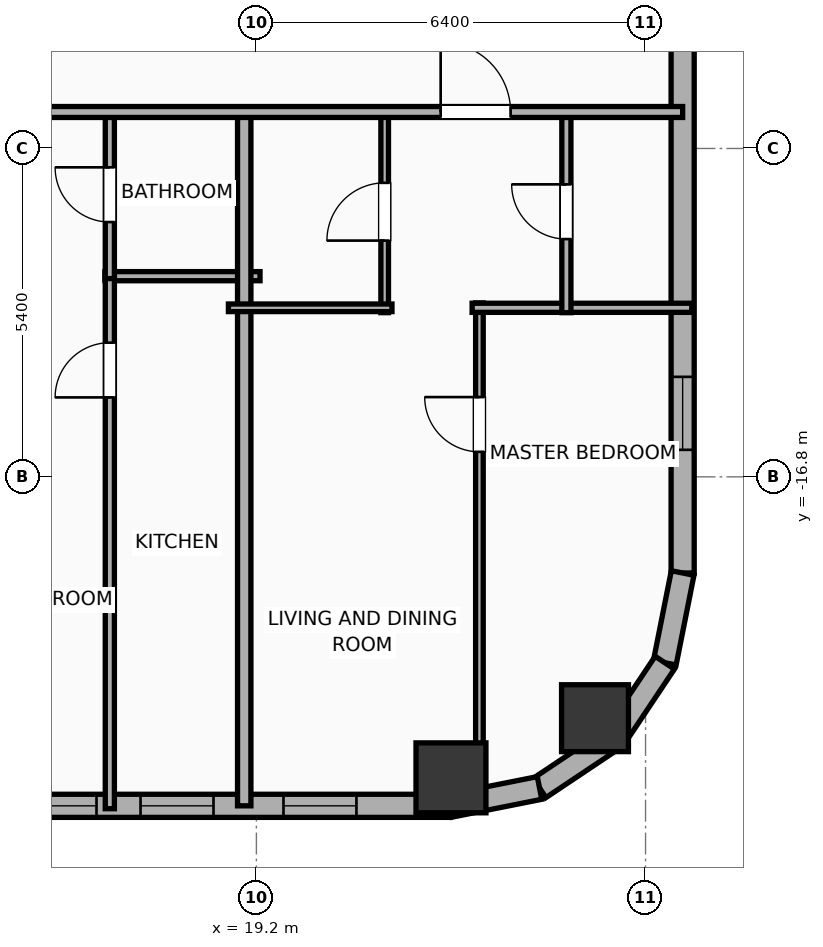
"""IFC4 building model, lengths in metres.
Left out: names, types, materials, properties, quantities, classifications, styles, units other than length and angle.
Written with IfcOpenShell. Run it as: python <this file> out.ifc"""

import sys

from ifc_helpers import new_model, si_unit, direction, frame, frame_2d, origin, origin_2d, place, context, subcontext, project, spatial, rectangle, hollow_rectangle, hollow_circle, extrude, element, fill, save


model = new_model("IFC4")
c1 = context("Model", 3, precision=1e-05, world=origin(), true_north=direction((0.0, 1.0)))
c2 = subcontext(c1, "Body", "Model", "MODEL_VIEW")
j1 = project(units=[si_unit("LENGTHUNIT", "METRE"), si_unit("PLANEANGLEUNIT", "RADIAN")], contexts=[c1])
p1 = place(None, origin())
s1 = spatial("IfcSite", under=j1, at=p1, CompositionType="ELEMENT")
p2 = place(p1, origin())
s2 = spatial("IfcBuilding", under=s1, at=p2, CompositionType="ELEMENT")
p3 = place(p2, frame((0.0, 0.0, 29.9)))
s3 = spatial("IfcBuildingStorey", under=s2, at=p3, CompositionType="ELEMENT", Elevation=29.9)
p4 = place(p3, frame((22.4, -21.75, 0.0), z_axis=(0.0, 0.0, 1.0), x_axis=(1.0, 0.0, 0.0)))
e1 = element("IfcColumn", 1, at=p4, inside=s3, PredefinedType="COLUMN", context=c2, shape_type="SweptSolid", body=[
    extrude(hollow_rectangle(XDim=1.15, YDim=1.15, WallThickness=0.04, at=origin_2d()), origin(), (0.0, 0.0, 1.0), 3.9),
])
p5 = place(p3, frame((24.769, -20.769, 0.0), z_axis=(0.0, 0.0, 1.0), x_axis=(1.0, 0.0, 0.0)))
e2 = element("IfcColumn", 2, at=p5, inside=s3, PredefinedType="COLUMN", context=c2, shape_type="SweptSolid", body=[
    extrude(hollow_circle(Radius=0.55, WallThickness=0.036, at=origin_2d()), origin(), (0.0, 0.0, 1.0), 3.9),
])
p6 = place(p3, frame((22.381, -22.21, 0.0), z_axis=(0.0, 0.0, 1.0), x_axis=(-1.0, 0.0, 0.0)))
e3 = element("IfcWall", 3, at=p6, inside=s3, PredefinedType="ELEMENTEDWALL", context=c2, shape_type="SweptSolid", body=[
    extrude(rectangle(XDim=51.963, YDim=0.38, at=frame_2d((25.981, 0.0))), origin(), (0.0, 0.0, 1.0), 2.54),
])
p7 = place(p6, frame((5.81, 0.0, 0.75)))
e4 = element("IfcOpeningElement", 4, at=p7, cuts=e3, PredefinedType="OPENING", context=c2, shape_type="SweptSolid", body=[
    extrude(rectangle(XDim=2.4, YDim=1.63, at=frame_2d((1.2, 0.815))), frame((0.0, 0.2, 0.0), z_axis=(0.0, -1.0, 0.0), x_axis=(1.0, 0.0, 0.0)), (0.0, 0.0, 1.0), 0.4),
])
p8 = place(p6, frame((26.431, 0.0, 0.75)))
e5 = element("IfcOpeningElement", 5, at=p8, cuts=e3, PredefinedType="OPENING", context=c2, shape_type="SweptSolid", body=[
    extrude(rectangle(XDim=2.4, YDim=1.63, at=frame_2d((1.2, 0.815))), frame((0.0, 0.2, 0.0), z_axis=(0.0, -1.0, 0.0), x_axis=(1.0, 0.0, 0.0)), (0.0, 0.0, 1.0), 0.4),
])
p9 = place(p6, frame((42.952, 0.0, 0.75)))
e6 = element("IfcOpeningElement", 6, at=p9, cuts=e3, PredefinedType="OPENING", context=c2, shape_type="SweptSolid", body=[
    extrude(rectangle(XDim=2.4, YDim=1.63, at=frame_2d((1.2, 0.815))), frame((0.0, 0.2, 0.0), z_axis=(0.0, -1.0, 0.0), x_axis=(1.0, 0.0, 0.0)), (0.0, 0.0, 1.0), 0.4),
])
p10 = place(p6, frame((49.027, 0.0, 0.75)))
e7 = element("IfcOpeningElement", 7, at=p10, cuts=e3, PredefinedType="OPENING", context=c2, shape_type="SweptSolid", body=[
    extrude(rectangle(XDim=1.2, YDim=1.63, at=frame_2d((0.6, 0.815))), frame((0.0, 0.2, 0.0), z_axis=(0.0, -1.0, 0.0), x_axis=(1.0, 0.0, 0.0)), (0.0, 0.0, 1.0), 0.4),
])
p11 = place(p6, frame((46.476, 0.0, 0.75)))
e8 = element("IfcOpeningElement", 8, at=p11, cuts=e3, PredefinedType="OPENING", context=c2, shape_type="SweptSolid", body=[
    extrude(rectangle(XDim=1.2, YDim=1.63, at=frame_2d((0.6, 0.815))), frame((0.0, 0.2, 0.0), z_axis=(0.0, -1.0, 0.0), x_axis=(1.0, 0.0, 0.0)), (0.0, 0.0, 1.0), 0.4),
])
p12 = place(p6, frame((39.181, 0.0, 0.75)))
e9 = element("IfcOpeningElement", 9, at=p12, cuts=e3, PredefinedType="OPENING", context=c2, shape_type="SweptSolid", body=[
    extrude(rectangle(XDim=1.2, YDim=1.63, at=frame_2d((0.6, 0.815))), frame((0.0, 0.2, 0.0), z_axis=(0.0, -1.0, 0.0), x_axis=(1.0, 0.0, 0.0)), (0.0, 0.0, 1.0), 0.4),
])
p13 = place(p6, frame((32.476, 0.0, 0.75)))
e10 = element("IfcOpeningElement", 10, at=p13, cuts=e3, PredefinedType="OPENING", context=c2, shape_type="SweptSolid", body=[
    extrude(rectangle(XDim=1.2, YDim=1.63, at=frame_2d((0.6, 0.815))), frame((0.0, 0.2, 0.0), z_axis=(0.0, -1.0, 0.0), x_axis=(1.0, 0.0, 0.0)), (0.0, 0.0, 1.0), 0.4),
])
p14 = place(p6, frame((35.276, 0.0, 0.75)))
e11 = element("IfcOpeningElement", 11, at=p14, cuts=e3, PredefinedType="OPENING", context=c2, shape_type="SweptSolid", body=[
    extrude(rectangle(XDim=1.2, YDim=1.63, at=frame_2d((0.6, 0.815))), frame((0.0, 0.2, 0.0), z_axis=(0.0, -1.0, 0.0), x_axis=(1.0, 0.0, 0.0)), (0.0, 0.0, 1.0), 0.4),
])
p15 = place(p6, frame((29.491, 0.0, 0.75)))
e12 = element("IfcOpeningElement", 12, at=p15, cuts=e3, PredefinedType="OPENING", context=c2, shape_type="SweptSolid", body=[
    extrude(rectangle(XDim=0.85, YDim=1.63, at=frame_2d((0.425, 0.815))), frame((0.0, 0.2, 0.0), z_axis=(0.0, -1.0, 0.0), x_axis=(1.0, 0.0, 0.0)), (0.0, 0.0, 1.0), 0.4),
])
p16 = place(p6, frame((21.596, 0.0, 0.75)))
e13 = element("IfcOpeningElement", 13, at=p16, cuts=e3, PredefinedType="OPENING", context=c2, shape_type="SweptSolid", body=[
    extrude(rectangle(XDim=1.2, YDim=1.63, at=frame_2d((0.6, 0.815))), frame((0.0, 0.2, 0.0), z_axis=(0.0, -1.0, 0.0), x_axis=(1.0, 0.0, 0.0)), (0.0, 0.0, 1.0), 0.4),
])
p17 = place(p6, frame((24.036, 0.0, 0.75)))
e14 = element("IfcOpeningElement", 14, at=p17, cuts=e3, PredefinedType="OPENING", context=c2, shape_type="SweptSolid", body=[
    extrude(rectangle(XDim=1.2, YDim=1.63, at=frame_2d((0.6, 0.815))), frame((0.0, 0.2, 0.0), z_axis=(0.0, -1.0, 0.0), x_axis=(1.0, 0.0, 0.0)), (0.0, 0.0, 1.0), 0.4),
])
p18 = place(p6, frame((17.886, 0.0, 0.75)))
e15 = element("IfcOpeningElement", 15, at=p18, cuts=e3, PredefinedType="OPENING", context=c2, shape_type="SweptSolid", body=[
    extrude(rectangle(XDim=1.2, YDim=1.63, at=frame_2d((0.6, 0.815))), frame((0.0, 0.2, 0.0), z_axis=(0.0, -1.0, 0.0), x_axis=(1.0, 0.0, 0.0)), (0.0, 0.0, 1.0), 0.4),
])
p19 = place(p6, frame((15.086, 0.0, 0.75)))
e16 = element("IfcOpeningElement", 16, at=p19, cuts=e3, PredefinedType="OPENING", context=c2, shape_type="SweptSolid", body=[
    extrude(rectangle(XDim=1.2, YDim=1.63, at=frame_2d((0.6, 0.815))), frame((0.0, 0.2, 0.0), z_axis=(0.0, -1.0, 0.0), x_axis=(1.0, 0.0, 0.0)), (0.0, 0.0, 1.0), 0.4),
])
p20 = place(p6, frame((11.181, 0.0, 0.75)))
e17 = element("IfcOpeningElement", 17, at=p20, cuts=e3, PredefinedType="OPENING", context=c2, shape_type="SweptSolid", body=[
    extrude(rectangle(XDim=1.2, YDim=1.63, at=frame_2d((0.6, 0.815))), frame((0.0, 0.2, 0.0), z_axis=(0.0, -1.0, 0.0), x_axis=(1.0, 0.0, 0.0)), (0.0, 0.0, 1.0), 0.4),
])
p21 = place(p6, frame((3.886, 0.0, 0.75)))
e18 = element("IfcOpeningElement", 18, at=p21, cuts=e3, PredefinedType="OPENING", context=c2, shape_type="SweptSolid", body=[
    extrude(rectangle(XDim=1.2, YDim=1.63, at=frame_2d((0.6, 0.815))), frame((0.0, 0.2, 0.0), z_axis=(0.0, -1.0, 0.0), x_axis=(1.0, 0.0, 0.0)), (0.0, 0.0, 1.0), 0.4),
])
p22 = place(p6, frame((1.536, 0.0, 0.75)))
e19 = element("IfcOpeningElement", 19, at=p22, cuts=e3, PredefinedType="OPENING", context=c2, shape_type="SweptSolid", body=[
    extrude(rectangle(XDim=1.2, YDim=1.63, at=frame_2d((0.6, 0.815))), frame((0.0, 0.2, 0.0), z_axis=(0.0, -1.0, 0.0), x_axis=(1.0, 0.0, 0.0)), (0.0, 0.0, 1.0), 0.4),
])
p23 = place(p3, frame((26.21, 18.381, 0.0), z_axis=(0.0, 0.0, 1.0), x_axis=(0.0, -1.0, 0.0)))
e20 = element("IfcWall", 20, at=p23, inside=s3, PredefinedType="ELEMENTEDWALL", context=c2, shape_type="SweptSolid", body=[
    extrude(rectangle(XDim=36.763, YDim=0.38, at=frame_2d((18.381, 0.0))), origin(), (0.0, 0.0, 1.0), 2.54),
])
p24 = place(p23, frame((33.537, 0.0, 0.75)))
e21 = element("IfcOpeningElement", 21, at=p24, cuts=e20, PredefinedType="OPENING", context=c2, shape_type="SweptSolid", body=[
    extrude(rectangle(XDim=1.2, YDim=1.63, at=frame_2d((0.6, 0.815))), frame((0.0, 0.2, 0.0), z_axis=(0.0, -1.0, 0.0), x_axis=(1.0, 0.0, 0.0)), (0.0, 0.0, 1.0), 0.4),
])
p25 = place(p3, frame((26.21, -18.381, 0.0), z_axis=(0.0, 0.0, 1.0), x_axis=(-0.195086038585, -0.980786132421, 0.0)))
e22 = element("IfcWall", 22, at=p25, inside=s3, PredefinedType="ELEMENTEDWALL", context=c2, shape_type="SweptSolid", body=[
    extrude(rectangle(XDim=1.504, YDim=0.38, at=frame_2d((0.752, 0.0))), origin(), (0.0, 0.0, 1.0), 3.65),
])
p26 = place(p3, frame((25.917, -19.857, 0.0), z_axis=(0.0, 0.0, 1.0), x_axis=(-0.555686231674, -0.831392092774, 0.0)))
e23 = element("IfcWall", 23, at=p26, inside=s3, PredefinedType="ELEMENTEDWALL", context=c2, shape_type="SweptSolid", body=[
    extrude(rectangle(XDim=1.485, YDim=0.38, at=frame_2d((0.743, 0.0))), origin(), (0.0, 0.0, 1.0), 3.65),
])
p27 = place(p3, frame((25.091, -21.091, 0.0), z_axis=(0.0, 0.0, 1.0), x_axis=(-0.831392092774, -0.555686231674, 0.0)))
e24 = element("IfcWall", 24, at=p27, inside=s3, PredefinedType="ELEMENTEDWALL", context=c2, shape_type="SweptSolid", body=[
    extrude(rectangle(XDim=1.485, YDim=0.38, at=frame_2d((0.743, 0.0))), origin(), (0.0, 0.0, 1.0), 2.54),
])
p28 = place(p3, frame((23.857, -21.917, 0.0), z_axis=(0.0, 0.0, 1.0), x_axis=(-0.980786132421, -0.195086038585, 0.0)))
e25 = element("IfcWall", 25, at=p28, inside=s3, PredefinedType="ELEMENTEDWALL", context=c2, shape_type="SweptSolid", body=[
    extrude(rectangle(XDim=1.504, YDim=0.38, at=frame_2d((0.752, 0.0))), origin(), (0.0, 0.0, 1.0), 2.54),
])
p29 = place(p3, frame((16.71, -13.5, 0.0), z_axis=(0.0, 0.0, 1.0), x_axis=(1.0, 0.0, 0.0)))
e26 = element("IfcWall", 26, at=p29, inside=s3, PredefinedType="PLUMBINGWALL", context=c2, shape_type="SweptSolid", body=[
    extrude(rectangle(XDim=2.55, YDim=0.15, at=frame_2d((1.275, 0.0))), origin(), (0.0, 0.0, 1.0), 3.65),
])
p30 = place(p3, frame((16.79, -22.258, 0.0), z_axis=(0.0, 0.0, 1.0), x_axis=(0.0, 1.0, 0.0)))
e27 = element("IfcWall", 27, at=p30, inside=s3, PredefinedType="PLUMBINGWALL", context=c2, shape_type="SweptSolid", body=[
    extrude(rectangle(XDim=8.798, YDim=0.15, at=frame_2d((4.399, 0.0))), origin(), (0.0, 0.0, 1.0), 3.65),
])
p31 = place(p30, frame((6.764, 0.0, 0.0)))
e28 = element("IfcOpeningElement", 28, at=p31, cuts=e27, PredefinedType="OPENING", context=c2, shape_type="SweptSolid", body=[
    extrude(rectangle(XDim=0.9, YDim=2.05, at=frame_2d((0.45, 1.025))), frame((0.0, 0.085, 0.0), z_axis=(0.0, -1.0, 0.0), x_axis=(1.0, 0.0, 0.0)), (0.0, 0.0, 1.0), 0.17),
])
p32 = place(p3, frame((16.79, -13.54, 0.0), z_axis=(0.0, 0.0, 1.0), x_axis=(0.0, 1.0, 0.0)))
e29 = element("IfcWall", 29, at=p32, inside=s3, PredefinedType="PLUMBINGWALL", context=c2, shape_type="SweptSolid", body=[
    extrude(rectangle(XDim=2.76, YDim=0.15, at=frame_2d((1.38, 0.0))), origin(), (0.0, 0.0, 1.0), 3.65),
])
p33 = place(p32, frame((0.93, 0.0, 0.0)))
e30 = element("IfcOpeningElement", 30, at=p33, cuts=e29, PredefinedType="OPENING", context=c2, shape_type="SweptSolid", body=[
    extrude(rectangle(XDim=0.9, YDim=2.05, at=frame_2d((0.45, 1.025))), frame((0.0, 0.085, 0.0), z_axis=(0.0, -1.0, 0.0), x_axis=(1.0, 0.0, 0.0)), (0.0, 0.0, 1.0), 0.17),
])
p34 = place(p3, frame((19.0, -22.21, 0.0), z_axis=(0.0, 0.0, 1.0), x_axis=(0.0, 1.0, 0.0)))
e31 = element("IfcWall", 31, at=p34, inside=s3, PredefinedType="PARTITIONING", context=c2, shape_type="SweptSolid", body=[
    extrude(rectangle(XDim=11.49, YDim=0.22, at=frame_2d((5.745, 0.0))), origin(), (0.0, 0.0, 1.0), 3.65),
])
p35 = place(p3, frame((22.868, -22.266, 0.0), z_axis=(0.0, 0.0, 1.0), x_axis=(0.0, 1.0, 0.0)))
e32 = element("IfcWall", 32, at=p35, inside=s3, PredefinedType="PARTITIONING", context=c2, shape_type="SweptSolid", body=[
    extrude(rectangle(XDim=8.326, YDim=0.125, at=frame_2d((4.163, 0.0))), origin(), (0.0, 0.0, 1.0), 2.54),
])
p36 = place(p35, frame((5.878, 0.0, 0.0)))
e33 = element("IfcOpeningElement", 33, at=p36, cuts=e32, PredefinedType="OPENING", context=c2, shape_type="SweptSolid", body=[
    extrude(rectangle(XDim=0.9, YDim=2.05, at=frame_2d((0.45, 1.025))), frame((0.0, 0.073, 0.0), z_axis=(0.0, -1.0, 0.0), x_axis=(1.0, 0.0, 0.0)), (0.0, 0.0, 1.0), 0.145),
])
p37 = place(p3, frame((22.748, -14.02, 0.0), z_axis=(0.0, 0.0, 1.0), x_axis=(1.0, 0.0, 0.0)))
e34 = element("IfcWall", 34, at=p37, inside=s3, PredefinedType="PLUMBINGWALL", context=c2, shape_type="SweptSolid", body=[
    extrude(rectangle(XDim=3.612, YDim=0.15, at=frame_2d((1.806, 0.0))), origin(), (0.0, 0.0, 1.0), 3.65),
])
p38 = place(p3, frame((21.31, -14.1, 0.0), z_axis=(0.0, 0.0, 1.0), x_axis=(0.0, 1.0, 0.0)))
e35 = element("IfcWall", 35, at=p38, inside=s3, PredefinedType="PARTITIONING", context=c2, shape_type="SweptSolid", body=[
    extrude(rectangle(XDim=3.32, YDim=0.125, at=frame_2d((1.66, 0.0))), origin(), (0.0, 0.0, 1.0), 3.65),
])
p39 = place(p38, frame((1.185, 0.0, 0.0)))
e36 = element("IfcOpeningElement", 36, at=p39, cuts=e35, PredefinedType="OPENING", context=c2, shape_type="SweptSolid", body=[
    extrude(rectangle(XDim=0.95, YDim=2.05, at=frame_2d((0.475, 1.025))), frame((0.0, 0.073, 0.0), z_axis=(0.0, -1.0, 0.0), x_axis=(1.0, 0.0, 0.0)), (0.0, 0.0, 1.0), 0.145),
])
p40 = place(p3, frame((18.74, -14.02, 0.0), z_axis=(0.0, 0.0, 1.0), x_axis=(1.0, 0.0, 0.0)))
e37 = element("IfcWall", 37, at=p40, inside=s3, PredefinedType="PARTITIONING", context=c2, shape_type="SweptSolid", body=[
    extrude(rectangle(XDim=2.69, YDim=0.125, at=frame_2d((1.345, 0.0))), origin(), (0.0, 0.0, 1.0), 3.65),
])
p41 = place(p3, frame((24.298, -14.1, 0.0), z_axis=(0.0, 0.0, 1.0), x_axis=(0.0, 1.0, 0.0)))
e38 = element("IfcWall", 38, at=p41, inside=s3, PredefinedType="PLUMBINGWALL", context=c2, shape_type="SweptSolid", body=[
    extrude(rectangle(XDim=3.32, YDim=0.15, at=frame_2d((1.66, 0.0))), origin(), (0.0, 0.0, 1.0), 3.65),
])
p42 = place(p41, frame((1.21, 0.0, 0.0)))
e39 = element("IfcOpeningElement", 39, at=p42, cuts=e38, PredefinedType="OPENING", context=c2, shape_type="SweptSolid", body=[
    extrude(rectangle(XDim=0.9, YDim=2.05, at=frame_2d((0.45, 1.025))), frame((0.0, 0.085, 0.0), z_axis=(0.0, -1.0, 0.0), x_axis=(1.0, 0.0, 0.0)), (0.0, 0.0, 1.0), 0.17),
])
p43 = place(p3, frame((-33.41, -10.8, 0.0), z_axis=(0.0, 0.0, 1.0), x_axis=(1.0, 0.0, 0.0)))
e40 = element("IfcWall", 40, at=p43, inside=s3, PredefinedType="PARTITIONING", context=c2, shape_type="SweptSolid", body=[
    extrude(rectangle(XDim=59.62, YDim=0.18, at=frame_2d((29.81, 0.0))), origin(), (0.0, 0.0, 1.0), 3.65),
])
p44 = place(p43, frame((3.36, 0.0, 0.0)))
e41 = element("IfcOpeningElement", 41, at=p44, cuts=e40, PredefinedType="OPENING", context=c2, shape_type="SweptSolid", body=[
    extrude(rectangle(XDim=1.15, YDim=2.05, at=frame_2d((0.575, 1.025))), frame((0.0, 0.1, 0.0), z_axis=(0.0, -1.0, 0.0), x_axis=(1.0, 0.0, 0.0)), (0.0, 0.0, 1.0), 0.2),
])
p45 = place(p43, frame((10.908, 0.0, 0.0)))
e42 = element("IfcOpeningElement", 42, at=p45, cuts=e40, PredefinedType="OPENING", context=c2, shape_type="SweptSolid", body=[
    extrude(rectangle(XDim=1.15, YDim=2.05, at=frame_2d((0.575, 1.025))), frame((0.0, 0.1, 0.0), z_axis=(0.0, -1.0, 0.0), x_axis=(1.0, 0.0, 0.0)), (0.0, 0.0, 1.0), 0.2),
])
p46 = place(p43, frame((15.755, 0.0, 0.0)))
e43 = element("IfcOpeningElement", 43, at=p46, cuts=e40, PredefinedType="OPENING", context=c2, shape_type="SweptSolid", body=[
    extrude(rectangle(XDim=0.9, YDim=2.05, at=frame_2d((0.45, 1.025))), frame((0.0, 0.1, 0.0), z_axis=(0.0, -1.0, 0.0), x_axis=(1.0, 0.0, 0.0)), (0.0, 0.0, 1.0), 0.2),
])
p47 = place(p43, frame((22.11, 0.0, 0.0)))
e44 = element("IfcOpeningElement", 44, at=p47, cuts=e40, PredefinedType="OPENING", context=c2, shape_type="SweptSolid", body=[
    extrude(rectangle(XDim=1.15, YDim=2.05, at=frame_2d((0.575, 1.025))), frame((0.0, 0.1, 0.0), z_axis=(0.0, -1.0, 0.0), x_axis=(1.0, 0.0, 0.0)), (0.0, 0.0, 1.0), 0.2),
])
p48 = place(p43, frame((27.709, 0.0, 0.0)))
e45 = element("IfcOpeningElement", 45, at=p48, cuts=e40, PredefinedType="OPENING", context=c2, shape_type="SweptSolid", body=[
    extrude(rectangle(XDim=1.15, YDim=2.05, at=frame_2d((0.575, 1.025))), frame((0.0, 0.1, 0.0), z_axis=(0.0, -1.0, 0.0), x_axis=(1.0, 0.0, 0.0)), (0.0, 0.0, 1.0), 0.2),
])
p49 = place(p43, frame((33.349, 0.0, 0.0)))
e46 = element("IfcOpeningElement", 46, at=p49, cuts=e40, PredefinedType="OPENING", context=c2, shape_type="SweptSolid", body=[
    extrude(rectangle(XDim=1.15, YDim=2.05, at=frame_2d((0.575, 1.025))), frame((0.0, 0.1, 0.0), z_axis=(0.0, -1.0, 0.0), x_axis=(1.0, 0.0, 0.0)), (0.0, 0.0, 1.0), 0.2),
])
p50 = place(p43, frame((36.759, 0.0, 0.0)))
e47 = element("IfcOpeningElement", 47, at=p50, cuts=e40, PredefinedType="OPENING", context=c2, shape_type="SweptSolid", body=[
    extrude(rectangle(XDim=1.15, YDim=2.05, at=frame_2d((0.575, 1.025))), frame((0.0, 0.1, 0.0), z_axis=(0.0, -1.0, 0.0), x_axis=(1.0, 0.0, 0.0)), (0.0, 0.0, 1.0), 0.2),
])
p51 = place(p43, frame((43.752, 0.0, 0.0)))
e48 = element("IfcOpeningElement", 48, at=p51, cuts=e40, PredefinedType="OPENING", context=c2, shape_type="SweptSolid", body=[
    extrude(rectangle(XDim=0.9, YDim=2.05, at=frame_2d((0.45, 1.025))), frame((0.0, 0.1, 0.0), z_axis=(0.0, -1.0, 0.0), x_axis=(1.0, 0.0, 0.0)), (0.0, 0.0, 1.0), 0.2),
])
p52 = place(p43, frame((47.962, 0.0, 0.0)))
e49 = element("IfcOpeningElement", 49, at=p52, cuts=e40, PredefinedType="OPENING", context=c2, shape_type="SweptSolid", body=[
    extrude(rectangle(XDim=1.15, YDim=2.05, at=frame_2d((0.575, 1.025))), frame((0.0, 0.1, 0.0), z_axis=(0.0, -1.0, 0.0), x_axis=(1.0, 0.0, 0.0)), (0.0, 0.0, 1.0), 0.2),
])
p53 = place(p43, frame((55.641, 0.0, 0.0)))
e50 = element("IfcOpeningElement", 50, at=p53, cuts=e40, PredefinedType="OPENING", context=c2, shape_type="SweptSolid", body=[
    extrude(rectangle(XDim=1.15, YDim=2.05, at=frame_2d((0.575, 1.025))), frame((0.0, 0.1, 0.0), z_axis=(0.0, -1.0, 0.0), x_axis=(1.0, 0.0, 0.0)), (0.0, 0.0, 1.0), 0.2),
])
p54 = place(p7, origin())
e51 = element("IfcWindow", 51, at=p54, inside=s3, PartitioningType="SINGLE_PANEL", PredefinedType="WINDOW", context=c2, shape_type="SweptSolid", body=[
    extrude(rectangle(XDim=2.4, YDim=1.63, at=frame_2d((1.2, 0.815))), frame((0.0, 0.03, 0.0), z_axis=(0.0, -1.0, 0.0), x_axis=(1.0, 0.0, 0.0)), (0.0, 0.0, 1.0), 0.06),
])
fill(e4, e51)
p55 = place(p21, origin())
e52 = element("IfcWindow", 52, at=p55, inside=s3, PartitioningType="SINGLE_PANEL", PredefinedType="WINDOW", context=c2, shape_type="SweptSolid", body=[
    extrude(rectangle(XDim=1.2, YDim=1.63, at=frame_2d((0.6, 0.815))), frame((0.0, 0.03, 0.0), z_axis=(0.0, -1.0, 0.0), x_axis=(1.0, 0.0, 0.0)), (0.0, 0.0, 1.0), 0.06),
])
fill(e18, e52)
p56 = place(p22, origin())
e53 = element("IfcWindow", 53, at=p56, inside=s3, PartitioningType="SINGLE_PANEL", PredefinedType="WINDOW", context=c2, shape_type="SweptSolid", body=[
    extrude(rectangle(XDim=1.2, YDim=1.63, at=frame_2d((0.6, 0.815))), frame((0.0, 0.03, 0.0), z_axis=(0.0, -1.0, 0.0), x_axis=(1.0, 0.0, 0.0)), (0.0, 0.0, 1.0), 0.06),
])
fill(e19, e53)
p57 = place(p24, origin())
e54 = element("IfcWindow", 54, at=p57, inside=s3, PartitioningType="SINGLE_PANEL", PredefinedType="WINDOW", context=c2, shape_type="SweptSolid", body=[
    extrude(rectangle(XDim=1.2, YDim=1.63, at=frame_2d((0.6, 0.815))), frame((0.0, 0.03, 0.0), z_axis=(0.0, -1.0, 0.0), x_axis=(1.0, 0.0, 0.0)), (0.0, 0.0, 1.0), 0.06),
])
fill(e21, e54)
p58 = place(p31, origin())
e55 = element("IfcDoor", 55, at=p58, inside=s3, OperationType="SINGLE_SWING_LEFT", PredefinedType="DOOR", context=c2, shape_type="SweptSolid", body=[
    extrude(rectangle(XDim=0.9, YDim=2.05, at=frame_2d((0.45, 1.025))), frame((0.0, 0.025, 0.0), z_axis=(0.0, -1.0, 0.0), x_axis=(1.0, 0.0, 0.0)), (0.0, 0.0, 1.0), 0.05),
])
fill(e28, e55)
p59 = place(p33, origin())
e56 = element("IfcDoor", 56, at=p59, inside=s3, OperationType="SINGLE_SWING_RIGHT", PredefinedType="DOOR", context=c2, shape_type="SweptSolid", body=[
    extrude(rectangle(XDim=0.9, YDim=2.05, at=frame_2d((0.45, 1.025))), frame((0.0, 0.025, 0.0), z_axis=(0.0, -1.0, 0.0), x_axis=(1.0, 0.0, 0.0)), (0.0, 0.0, 1.0), 0.05),
])
fill(e30, e56)
p60 = place(p36, origin())
e57 = element("IfcDoor", 57, at=p60, inside=s3, OperationType="SINGLE_SWING_RIGHT", PredefinedType="DOOR", context=c2, shape_type="SweptSolid", body=[
    extrude(rectangle(XDim=0.9, YDim=2.05, at=frame_2d((0.45, 1.025))), frame((0.0, 0.025, 0.0), z_axis=(0.0, -1.0, 0.0), x_axis=(1.0, 0.0, 0.0)), (0.0, 0.0, 1.0), 0.05),
])
fill(e33, e57)
p61 = place(p39, origin())
e58 = element("IfcDoor", 58, at=p61, inside=s3, OperationType="SINGLE_SWING_LEFT", PredefinedType="DOOR", context=c2, shape_type="SweptSolid", body=[
    extrude(rectangle(XDim=0.95, YDim=2.05, at=frame_2d((0.475, 1.025))), frame((0.0, 0.025, 0.0), z_axis=(0.0, -1.0, 0.0), x_axis=(1.0, 0.0, 0.0)), (0.0, 0.0, 1.0), 0.05),
])
fill(e36, e58)
p62 = place(p42, origin())
e59 = element("IfcDoor", 59, at=p62, inside=s3, OperationType="SINGLE_SWING_RIGHT", PredefinedType="DOOR", context=c2, shape_type="SweptSolid", body=[
    extrude(rectangle(XDim=0.9, YDim=2.05, at=frame_2d((0.45, 1.025))), frame((0.0, 0.025, 0.0), z_axis=(0.0, -1.0, 0.0), x_axis=(1.0, 0.0, 0.0)), (0.0, 0.0, 1.0), 0.05),
])
fill(e39, e59)
p63 = place(p53, origin())
e60 = element("IfcDoor", 60, at=p63, inside=s3, OperationType="SINGLE_SWING_LEFT", PredefinedType="DOOR", context=c2, shape_type="SweptSolid", body=[
    extrude(rectangle(XDim=1.15, YDim=2.05, at=frame_2d((0.575, 1.025))), frame((0.0, 0.025, 0.0), z_axis=(0.0, -1.0, 0.0), x_axis=(1.0, 0.0, 0.0)), (0.0, 0.0, 1.0), 0.05),
])
fill(e50, e60)
save(model, sys.argv[1])
